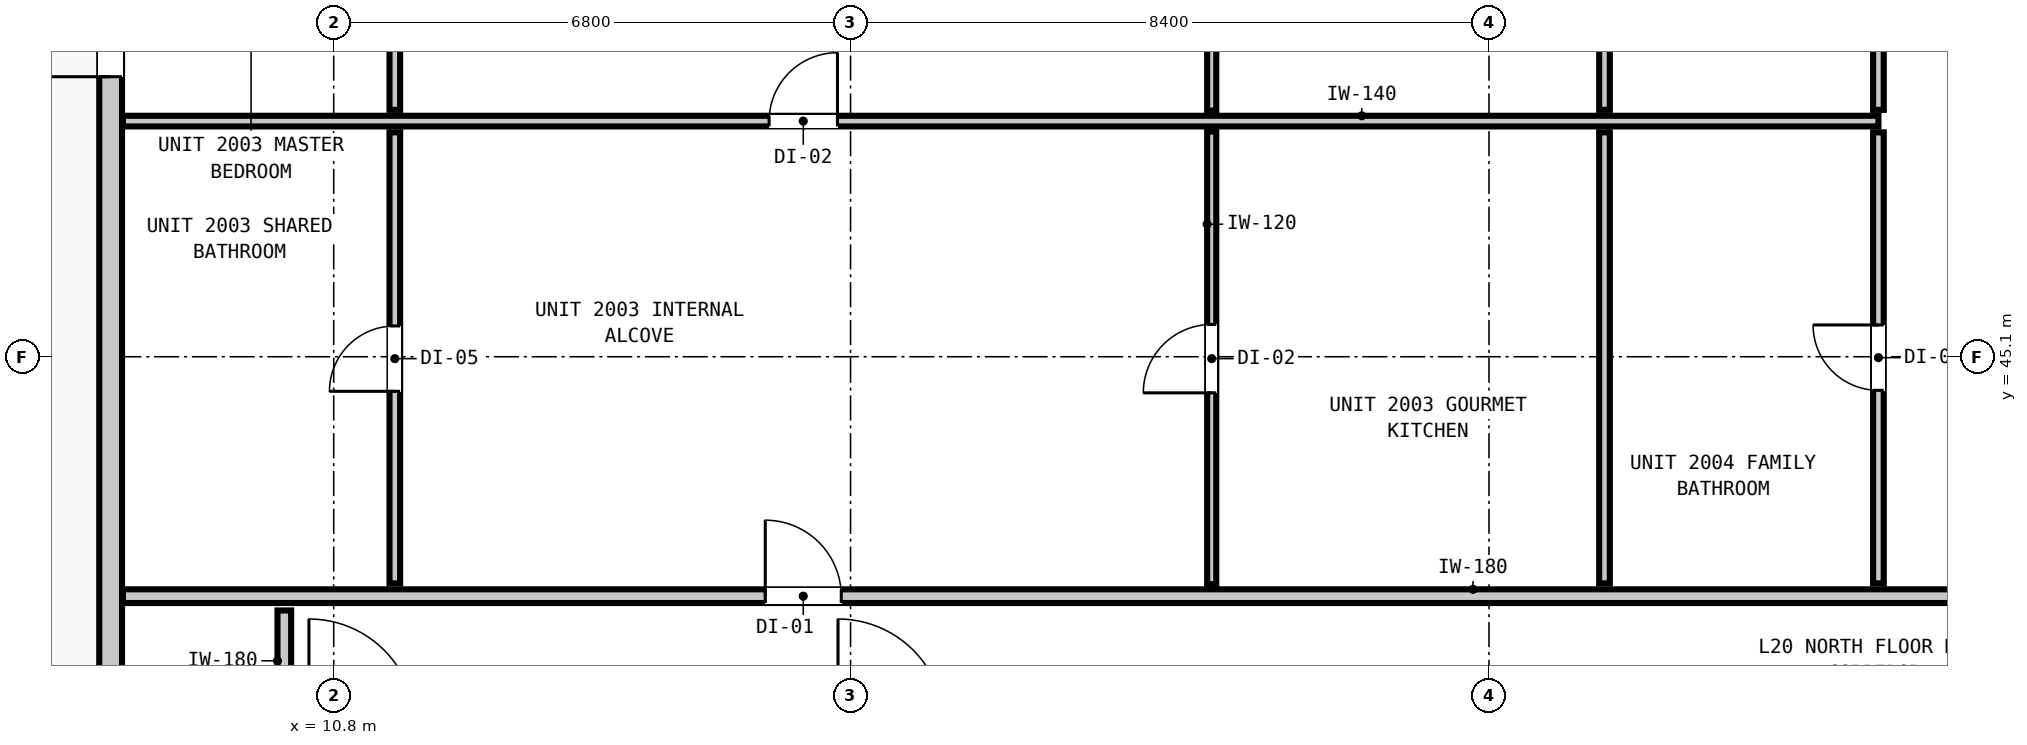
"""IFC4 building model, lengths in metres.
Left out: names, types, materials, properties, quantities, classifications, styles, units other than length and angle.
Written with IfcOpenShell. Run it as: python <this file> out.ifc"""

import sys

from ifc_helpers import new_model, si_unit, direction, frame, frame_2d, origin, place, context, subcontext, project, spatial, rectangle, extrude, element, fill, save


model = new_model("IFC4")
c1 = context("Model", 3, precision=1e-05, world=origin(), true_north=direction((0.0, 1.0)))
c2 = subcontext(c1, "Body", "Model", "MODEL_VIEW")
j1 = project(units=[si_unit("LENGTHUNIT", "METRE"), si_unit("PLANEANGLEUNIT", "RADIAN")], contexts=[c1])
p1 = place(None, origin())
s1 = spatial("IfcSite", under=j1, at=p1, CompositionType="ELEMENT")
p2 = place(p1, origin())
s2 = spatial("IfcBuilding", under=s1, at=p2, CompositionType="ELEMENT")
p3 = place(p2, frame((0.0, 0.0, 71.8)))
s3 = spatial("IfcBuildingStorey", under=s2, at=p3, CompositionType="ELEMENT", Elevation=71.8)
p4 = place(p3, frame((7.865, 16.365, 0.0), z_axis=(0.0, 0.0, 1.0), x_axis=(0.0, 1.0, 0.0)))
e1 = element("IfcWall", 1, at=p4, inside=s3, PredefinedType="STANDARD", context=c2, shape_type="SweptSolid", body=[
    extrude(rectangle(XDim=34.67, YDim=0.3, at=frame_2d((17.335, 0.0))), origin(), (0.0, 0.0, 1.0), 3.06),
])
p5 = place(p4, frame((32.419, 0.0, 0.0)))
e2 = element("IfcOpeningElement", 2, at=p5, cuts=e1, PredefinedType="OPENING", context=c2, shape_type="SweptSolid", body=[
    extrude(rectangle(XDim=1.0, YDim=2.15, at=frame_2d((0.5, 1.075))), frame((0.0, 0.16, 0.0), z_axis=(0.0, -1.0, 0.0), x_axis=(1.0, 0.0, 0.0)), (0.0, 0.0, 1.0), 0.32),
])
p6 = place(p4, frame((33.809, 0.0, 0.85)))
e3 = element("IfcOpeningElement", 3, at=p6, cuts=e1, PredefinedType="OPENING", context=c2, shape_type="SweptSolid", body=[
    extrude(rectangle(XDim=0.58, YDim=1.5, at=frame_2d((0.29, 0.75))), frame((0.0, 0.16, 0.0), z_axis=(0.0, -1.0, 0.0), x_axis=(1.0, 0.0, 0.0)), (0.0, 0.0, 1.0), 0.32),
])
p7 = place(p3, frame((8.027, 41.95, 0.0), z_axis=(0.0, 0.0, 1.0), x_axis=(1.0, 0.0, 0.0)))
e4 = element("IfcWall", 4, at=p7, inside=s3, PredefinedType="PARTITIONING", context=c2, shape_type="SweptSolid", body=[
    extrude(rectangle(XDim=42.146, YDim=0.18, at=frame_2d((21.073, 0.0))), origin(), (0.0, 0.0, 1.0), 3.06),
])
p8 = place(p7, frame((8.451, 0.0, 0.0)))
e5 = element("IfcOpeningElement", 5, at=p8, cuts=e4, PredefinedType="OPENING", context=c2, shape_type="SweptSolid", body=[
    extrude(rectangle(XDim=1.0, YDim=2.15, at=frame_2d((0.5, 1.075))), frame((0.0, 0.1, 0.0), z_axis=(0.0, -1.0, 0.0), x_axis=(1.0, 0.0, 0.0)), (0.0, 0.0, 1.0), 0.2),
])
p9 = place(p7, frame((26.075, 0.0, 0.0)))
e6 = element("IfcOpeningElement", 6, at=p9, cuts=e4, PredefinedType="OPENING", context=c2, shape_type="SweptSolid", body=[
    extrude(rectangle(XDim=1.0, YDim=2.15, at=frame_2d((0.5, 1.075))), frame((0.0, 0.1, 0.0), z_axis=(0.0, -1.0, 0.0), x_axis=(1.0, 0.0, 0.0)), (0.0, 0.0, 1.0), 0.2),
])
p10 = place(p3, frame((8.027, 48.2, 0.0), z_axis=(0.0, 0.0, 1.0), x_axis=(1.0, 0.0, 0.0)))
e7 = element("IfcWall", 7, at=p10, inside=s3, PredefinedType="PARTITIONING", context=c2, shape_type="SweptSolid", body=[
    extrude(rectangle(XDim=23.097, YDim=0.14, at=frame_2d((11.548, 0.0))), origin(), (0.0, 0.0, 1.0), 3.06),
])
p11 = place(p10, frame((8.501, 0.0, 0.0)))
e8 = element("IfcOpeningElement", 8, at=p11, cuts=e7, PredefinedType="OPENING", context=c2, shape_type="SweptSolid", body=[
    extrude(rectangle(XDim=0.9, YDim=2.1, at=frame_2d((0.45, 1.05))), frame((0.0, 0.08, 0.0), z_axis=(0.0, -1.0, 0.0), x_axis=(1.0, 0.0, 0.0)), (0.0, 0.0, 1.0), 0.16),
])
p12 = place(p3, frame((10.15, 40.438, 0.0), z_axis=(0.0, 0.0, 1.0), x_axis=(0.0, 1.0, 0.0)))
e9 = element("IfcWall", 9, at=p12, inside=s3, PredefinedType="PARTITIONING", context=c2, shape_type="SweptSolid", body=[
    extrude(rectangle(XDim=1.324, YDim=0.18, at=frame_2d((0.662, 0.0))), origin(), (0.0, 0.0, 1.0), 3.06),
])
p13 = place(p3, frame((11.604, 42.118, 0.0), z_axis=(0.0, 0.0, 1.0), x_axis=(0.0, 1.0, 0.0)))
e10 = element("IfcWall", 10, at=p13, inside=s3, PredefinedType="PARTITIONING", context=c2, shape_type="SweptSolid", body=[
    extrude(rectangle(XDim=5.934, YDim=0.14, at=frame_2d((2.967, 0.0))), origin(), (0.0, 0.0, 1.0), 2.445),
])
p14 = place(p13, frame((2.527, 0.0, 0.0)))
e11 = element("IfcOpeningElement", 11, at=p14, cuts=e10, PredefinedType="OPENING", context=c2, shape_type="SweptSolid", body=[
    extrude(rectangle(XDim=0.86, YDim=2.02, at=frame_2d((0.43, 1.01))), frame((0.0, 0.08, 0.0), z_axis=(0.0, -1.0, 0.0), x_axis=(1.0, 0.0, 0.0)), (0.0, 0.0, 1.0), 0.16),
])
p15 = place(p3, frame((11.604, 48.348, 0.0), z_axis=(0.0, 0.0, 1.0), x_axis=(0.0, 1.0, 0.0)))
e12 = element("IfcWall", 12, at=p15, inside=s3, PredefinedType="PARTITIONING", context=c2, shape_type="SweptSolid", body=[
    extrude(rectangle(XDim=4.135, YDim=0.14, at=frame_2d((2.067, 0.0))), origin(), (0.0, 0.0, 1.0), 2.445),
])
p16 = place(p15, frame((2.002, 0.0, 0.0)))
e13 = element("IfcOpeningElement", 13, at=p16, cuts=e12, PredefinedType="OPENING", context=c2, shape_type="SweptSolid", body=[
    extrude(rectangle(XDim=0.9, YDim=2.1, at=frame_2d((0.45, 1.05))), frame((0.0, 0.08, 0.0), z_axis=(0.0, -1.0, 0.0), x_axis=(1.0, 0.0, 0.0)), (0.0, 0.0, 1.0), 0.16),
])
p17 = place(p3, frame((27.52, 42.118, 0.0), z_axis=(0.0, 0.0, 1.0), x_axis=(0.0, 1.0, 0.0)))
e14 = element("IfcWall", 14, at=p17, inside=s3, PredefinedType="PARTITIONING", context=c2, shape_type="SweptSolid", body=[
    extrude(rectangle(XDim=5.934, YDim=0.14, at=frame_2d((2.967, 0.0))), origin(), (0.0, 0.0, 1.0), 3.06),
])
p18 = place(p3, frame((27.52, 48.348, 0.0), z_axis=(0.0, 0.0, 1.0), x_axis=(0.0, 1.0, 0.0)))
e15 = element("IfcWall", 15, at=p18, inside=s3, PredefinedType="PARTITIONING", context=c2, shape_type="SweptSolid", body=[
    extrude(rectangle(XDim=5.025, YDim=0.14, at=frame_2d((2.513, 0.0))), origin(), (0.0, 0.0, 1.0), 3.06),
])
p19 = place(p3, frame((31.124, 42.118, 0.0), z_axis=(0.0, 0.0, 1.0), x_axis=(0.0, 1.0, 0.0)))
e16 = element("IfcWall", 16, at=p19, inside=s3, PredefinedType="PARTITIONING", context=c2, shape_type="SweptSolid", body=[
    extrude(rectangle(XDim=5.934, YDim=0.14, at=frame_2d((2.967, 0.0))), origin(), (0.0, 0.0, 1.0), 3.06),
])
p20 = place(p19, frame((2.54, 0.0, 0.0)))
e17 = element("IfcOpeningElement", 17, at=p20, cuts=e16, PredefinedType="OPENING", context=c2, shape_type="SweptSolid", body=[
    extrude(rectangle(XDim=0.86, YDim=2.02, at=frame_2d((0.43, 1.01))), frame((0.0, 0.08, 0.0), z_axis=(0.0, -1.0, 0.0), x_axis=(1.0, 0.0, 0.0)), (0.0, 0.0, 1.0), 0.16),
])
p21 = place(p3, frame((31.124, 48.348, 0.0), z_axis=(0.0, 0.0, 1.0), x_axis=(0.0, 1.0, 0.0)))
e18 = element("IfcWall", 18, at=p21, inside=s3, PredefinedType="PARTITIONING", context=c2, shape_type="SweptSolid", body=[
    extrude(rectangle(XDim=5.025, YDim=0.14, at=frame_2d((2.513, 0.0))), origin(), (0.0, 0.0, 1.0), 3.06),
])
p22 = place(p21, frame((1.989, 0.0, 0.0)))
e19 = element("IfcOpeningElement", 19, at=p22, cuts=e18, PredefinedType="OPENING", context=c2, shape_type="SweptSolid", body=[
    extrude(rectangle(XDim=0.9, YDim=2.1, at=frame_2d((0.45, 1.05))), frame((0.0, 0.08, 0.0), z_axis=(0.0, -1.0, 0.0), x_axis=(1.0, 0.0, 0.0)), (0.0, 0.0, 1.0), 0.16),
])
p23 = place(p3, frame((22.352, 42.108, 0.0), z_axis=(0.0, 0.0, 1.0), x_axis=(0.0, 1.0, 0.0)))
e20 = element("IfcWall", 20, at=p23, inside=s3, PredefinedType="PARTITIONING", context=c2, shape_type="SweptSolid", body=[
    extrude(rectangle(XDim=5.954, YDim=0.12, at=frame_2d((2.977, 0.0))), origin(), (0.0, 0.0, 1.0), 3.06),
])
p24 = place(p23, frame((2.517, 0.0, 0.0)))
e21 = element("IfcOpeningElement", 21, at=p24, cuts=e20, PredefinedType="OPENING", context=c2, shape_type="SweptSolid", body=[
    extrude(rectangle(XDim=0.9, YDim=2.1, at=frame_2d((0.45, 1.05))), frame((0.0, 0.07, 0.0), z_axis=(0.0, -1.0, 0.0), x_axis=(1.0, 0.0, 0.0)), (0.0, 0.0, 1.0), 0.14),
])
p25 = place(p3, frame((22.352, 48.338, 0.0), z_axis=(0.0, 0.0, 1.0), x_axis=(0.0, 1.0, 0.0)))
e22 = element("IfcWall", 22, at=p25, inside=s3, PredefinedType="PARTITIONING", context=c2, shape_type="SweptSolid", body=[
    extrude(rectangle(XDim=5.035, YDim=0.12, at=frame_2d((2.518, 0.0))), origin(), (0.0, 0.0, 1.0), 3.06),
])
p26 = place(p25, frame((2.012, 0.0, 0.0)))
e23 = element("IfcOpeningElement", 23, at=p26, cuts=e22, PredefinedType="OPENING", context=c2, shape_type="SweptSolid", body=[
    extrude(rectangle(XDim=0.9, YDim=2.1, at=frame_2d((0.45, 1.05))), frame((0.0, 0.07, 0.0), z_axis=(0.0, -1.0, 0.0), x_axis=(1.0, 0.0, 0.0)), (0.0, 0.0, 1.0), 0.14),
])
p27 = place(p5, origin())
e24 = element("IfcDoor", 24, at=p27, inside=s3, OperationType="SINGLE_SWING_LEFT", PredefinedType="DOOR", context=c2, shape_type="SweptSolid", body=[
    extrude(rectangle(XDim=1.0, YDim=2.15, at=frame_2d((0.5, 1.075))), frame((0.0, 0.025, 0.0), z_axis=(0.0, -1.0, 0.0), x_axis=(1.0, 0.0, 0.0)), (0.0, 0.0, 1.0), 0.05),
])
fill(e2, e24)
p28 = place(p8, origin())
e25 = element("IfcDoor", 25, at=p28, inside=s3, OperationType="SINGLE_SWING_LEFT", PredefinedType="DOOR", context=c2, shape_type="SweptSolid", body=[
    extrude(rectangle(XDim=1.0, YDim=2.15, at=frame_2d((0.5, 1.075))), frame((0.0, 0.025, 0.0), z_axis=(0.0, -1.0, 0.0), x_axis=(1.0, 0.0, 0.0)), (0.0, 0.0, 1.0), 0.05),
])
fill(e5, e25)
p29 = place(p11, origin())
e26 = element("IfcDoor", 26, at=p29, inside=s3, OperationType="SINGLE_SWING_RIGHT", PredefinedType="DOOR", context=c2, shape_type="SweptSolid", body=[
    extrude(rectangle(XDim=0.9, YDim=2.1, at=frame_2d((0.45, 1.05))), frame((0.0, 0.025, 0.0), z_axis=(0.0, -1.0, 0.0), x_axis=(1.0, 0.0, 0.0)), (0.0, 0.0, 1.0), 0.05),
])
fill(e8, e26)
p30 = place(p14, origin())
e27 = element("IfcDoor", 27, at=p30, inside=s3, OperationType="SINGLE_SWING_LEFT", PredefinedType="DOOR", context=c2, shape_type="SweptSolid", body=[
    extrude(rectangle(XDim=0.86, YDim=2.02, at=frame_2d((0.43, 1.01))), frame((0.0, 0.025, 0.0), z_axis=(0.0, -1.0, 0.0), x_axis=(1.0, 0.0, 0.0)), (0.0, 0.0, 1.0), 0.05),
])
fill(e11, e27)
p31 = place(p24, origin())
e28 = element("IfcDoor", 28, at=p31, inside=s3, OperationType="SINGLE_SWING_LEFT", PredefinedType="DOOR", context=c2, shape_type="SweptSolid", body=[
    extrude(rectangle(XDim=0.9, YDim=2.1, at=frame_2d((0.45, 1.05))), frame((0.0, 0.025, 0.0), z_axis=(0.0, -1.0, 0.0), x_axis=(1.0, 0.0, 0.0)), (0.0, 0.0, 1.0), 0.05),
])
fill(e21, e28)
p32 = place(p20, origin())
e29 = element("IfcDoor", 29, at=p32, inside=s3, OperationType="SINGLE_SWING_RIGHT", PredefinedType="DOOR", context=c2, shape_type="SweptSolid", body=[
    extrude(rectangle(XDim=0.86, YDim=2.02, at=frame_2d((0.43, 1.01))), frame((0.0, 0.025, 0.0), z_axis=(0.0, -1.0, 0.0), x_axis=(1.0, 0.0, 0.0)), (0.0, 0.0, 1.0), 0.05),
])
fill(e17, e29)
save(model, sys.argv[1])
